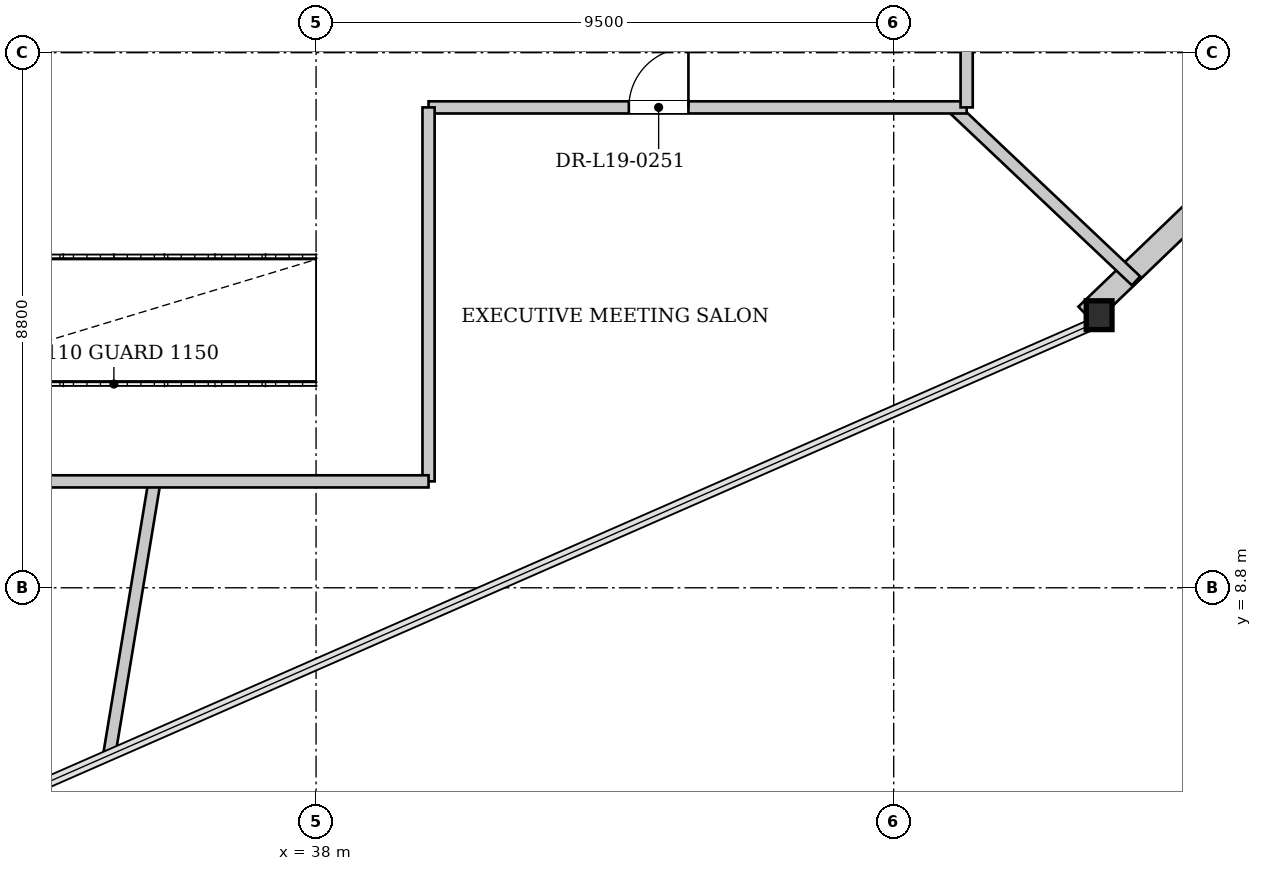
"""IFC4 building model, lengths in metres.
Left out: names, types, materials, properties, quantities, classifications, styles, units other than length and angle.
Written with IfcOpenShell. Run it as: python <this file> out.ifc"""

import sys

from ifc_helpers import new_model, si_unit, direction, frame, frame_2d, origin, origin_2d, place, context, subcontext, project, spatial, rectangle, i_section, extrude, source, transform, mapped, element, fill, save


model = new_model("IFC4")
c1 = context("Model", 3, precision=1e-05, world=origin(), true_north=direction((0.0, 1.0)))
c2 = subcontext(c1, "Body", "Model", "MODEL_VIEW")
j1 = project(units=[si_unit("LENGTHUNIT", "METRE"), si_unit("PLANEANGLEUNIT", "RADIAN")], contexts=[c1])
p1 = place(None, origin())
s1 = spatial("IfcSite", under=j1, at=p1, CompositionType="ELEMENT")
p2 = place(p1, origin())
s2 = spatial("IfcBuilding", under=s1, at=p2, CompositionType="ELEMENT")
p3 = place(p2, frame((0.0, 0.0, 75.9)))
s3 = spatial("IfcBuildingStorey", under=s2, at=p3, CompositionType="ELEMENT", Elevation=75.9)
m1 = source(origin(), c2, "Body", "SweptSolid", [
    extrude(i_section(OverallWidth=0.424, OverallDepth=0.474, WebThickness=0.043, FlangeThickness=0.068, at=origin_2d()), origin(), (0.0, 0.0, 1.0), 3.848),
])
p4 = place(p3, frame((50.801, 13.149, 0.0), z_axis=(0.040228034609, 0.069732823399, 0.996754251846), x_axis=(-0.866198707335, 0.499699709236, 0.0)))
e1 = element("IfcColumn", 1, at=p4, inside=s3, PredefinedType="COLUMN", context=c2, shape_type="MappedRepresentation", body=[
    mapped(m1, transform((0.0, 0.0, 0.0), x_axis=(1.0, 0.0, 0.0), y_axis=(0.0, 1.0, 0.0), z_axis=(0.0, 0.0, 1.0), scale=1.0)),
])
p5 = place(p3, frame((68.164, 30.08, 0.0), z_axis=(0.0, 0.0, 1.0), x_axis=(-0.721395971685, -0.692522816979, 0.0)))
e2 = element("IfcWall", 2, at=p5, inside=s3, PredefinedType="SOLIDWALL", context=c2, shape_type="SweptSolid", body=[
    extrude(rectangle(XDim=24.251, YDim=0.38, at=frame_2d((12.125, 0.0))), origin(), (0.0, 0.0, 1.0), 2.872),
])
p6 = place(p5, frame((5.69, 0.0, 0.502)))
e3 = element("IfcOpeningElement", 3, at=p6, cuts=e2, PredefinedType="OPENING", context=c2, shape_type="SweptSolid", body=[
    extrude(rectangle(XDim=2.2, YDim=2.25, at=frame_2d((1.1, 1.125))), frame((0.0, 0.2, 0.0), z_axis=(0.0, -1.0, 0.0), x_axis=(1.0, 0.0, 0.0)), (0.0, 0.0, 1.0), 0.4),
])
p7 = place(p5, frame((16.36, 0.0, 0.502)))
e4 = element("IfcOpeningElement", 4, at=p7, cuts=e2, PredefinedType="OPENING", context=c2, shape_type="SweptSolid", body=[
    extrude(rectangle(XDim=2.2, YDim=2.25, at=frame_2d((1.1, 1.125))), frame((0.0, 0.2, 0.0), z_axis=(0.0, -1.0, 0.0), x_axis=(1.0, 0.0, 0.0)), (0.0, 0.0, 1.0), 0.4),
])
p8 = place(p3, frame((35.343, 10.55, 0.0), z_axis=(0.0, 0.0, 1.0), x_axis=(-0.163323758673, -0.986572526403, 0.0)))
e5 = element("IfcWall", 5, at=p8, inside=s3, PredefinedType="PARTITIONING", context=c2, shape_type="SweptSolid", body=[
    extrude(rectangle(XDim=4.529, YDim=0.2, at=frame_2d((2.265, 0.0))), origin(), (0.0, 0.0, 1.0), 3.58),
])
p9 = place(p3, frame((48.469, 16.7, 0.0), z_axis=(0.0, 0.0, 1.0), x_axis=(0.726589007233, -0.687072350316, 0.0)))
e6 = element("IfcWall", 6, at=p9, inside=s3, PredefinedType="PARTITIONING", context=c2, shape_type="SweptSolid", body=[
    extrude(rectangle(XDim=4.152, YDim=0.2, at=frame_2d((2.076, 0.0))), origin(), (0.0, 0.0, 1.0), 3.58),
])
p10 = place(p3, frame((39.85, 16.7, 0.0), z_axis=(0.0, 0.0, 1.0), x_axis=(1.0, 0.0, 0.0)))
e7 = element("IfcWall", 7, at=p10, inside=s3, PredefinedType="PARTITIONING", context=c2, shape_type="SweptSolid", body=[
    extrude(rectangle(XDim=8.85, YDim=0.2, at=frame_2d((4.425, 0.0))), origin(), (0.0, 0.0, 1.0), 3.58),
])
p11 = place(p10, frame((3.294, 0.0, 0.0)))
e8 = element("IfcOpeningElement", 8, at=p11, cuts=e7, PredefinedType="OPENING", context=c2, shape_type="SweptSolid", body=[
    extrude(rectangle(XDim=0.98, YDim=2.15, at=frame_2d((0.49, 1.075))), frame((0.0, 0.11, 0.0), z_axis=(0.0, -1.0, 0.0), x_axis=(1.0, 0.0, 0.0)), (0.0, 0.0, 1.0), 0.22),
])
p12 = place(p3, frame((48.7, 16.7, 0.0), z_axis=(0.0, 0.0, 1.0), x_axis=(0.0, 1.0, 0.0)))
e9 = element("IfcWall", 9, at=p12, inside=s3, PredefinedType="PARTITIONING", context=c2, shape_type="SweptSolid", body=[
    extrude(rectangle(XDim=19.8, YDim=0.2, at=frame_2d((9.9, 0.0))), origin(), (0.0, 0.0, 1.0), 3.58),
])
p13 = place(p12, frame((2.915, 0.0, 0.0)))
e10 = element("IfcOpeningElement", 10, at=p13, cuts=e9, PredefinedType="OPENING", context=c2, shape_type="SweptSolid", body=[
    extrude(rectangle(XDim=0.98, YDim=2.15, at=frame_2d((0.49, 1.075))), frame((0.0, 0.11, 0.0), z_axis=(0.0, -1.0, 0.0), x_axis=(1.0, 0.0, 0.0)), (0.0, 0.0, 1.0), 0.22),
])
p14 = place(p12, frame((15.958, 0.0, 0.0)))
e11 = element("IfcOpeningElement", 11, at=p14, cuts=e9, PredefinedType="OPENING", context=c2, shape_type="SweptSolid", body=[
    extrude(rectangle(XDim=0.98, YDim=2.15, at=frame_2d((0.49, 1.075))), frame((0.0, 0.11, 0.0), z_axis=(0.0, -1.0, 0.0), x_axis=(1.0, 0.0, 0.0)), (0.0, 0.0, 1.0), 0.22),
])
p15 = place(p3, frame((39.85, 10.55, 0.0), z_axis=(0.0, 0.0, 1.0), x_axis=(0.0, 1.0, 0.0)))
e12 = element("IfcWall", 12, at=p15, inside=s3, PredefinedType="PARTITIONING", context=c2, shape_type="SweptSolid", body=[
    extrude(rectangle(XDim=6.15, YDim=0.2, at=frame_2d((3.075, 0.0))), origin(), (0.0, 0.0, 1.0), 3.58),
])
p16 = place(p3, frame((29.55, 10.55, 0.0), z_axis=(0.0, 0.0, 1.0), x_axis=(1.0, 0.0, 0.0)))
e13 = element("IfcWall", 13, at=p16, inside=s3, PredefinedType="PARTITIONING", context=c2, shape_type="SweptSolid", body=[
    extrude(rectangle(XDim=10.3, YDim=0.2, at=frame_2d((5.15, 0.0))), origin(), (0.0, 0.0, 1.0), 3.205),
])
m2 = source(origin(), c2, "Body", "SweptSolid", [
    extrude(rectangle(XDim=0.98, YDim=2.15, at=frame_2d((0.49, 1.075))), frame((0.0, 0.025, 0.0), z_axis=(0.0, -1.0, 0.0), x_axis=(1.0, 0.0, 0.0)), (0.0, 0.0, 1.0), 0.05),
])
p17 = place(p11, origin())
e14 = element("IfcDoor", 14, at=p17, inside=s3, OperationType="SINGLE_SWING_RIGHT", PredefinedType="DOOR", context=c2, shape_type="MappedRepresentation", body=[
    mapped(m2, transform((0.0, 0.0, 0.0), x_axis=(1.0, 0.0, 0.0), y_axis=(0.0, 1.0, 0.0), z_axis=(0.0, 0.0, 1.0), scale=1.0)),
])
fill(e8, e14)
save(model, sys.argv[1])
